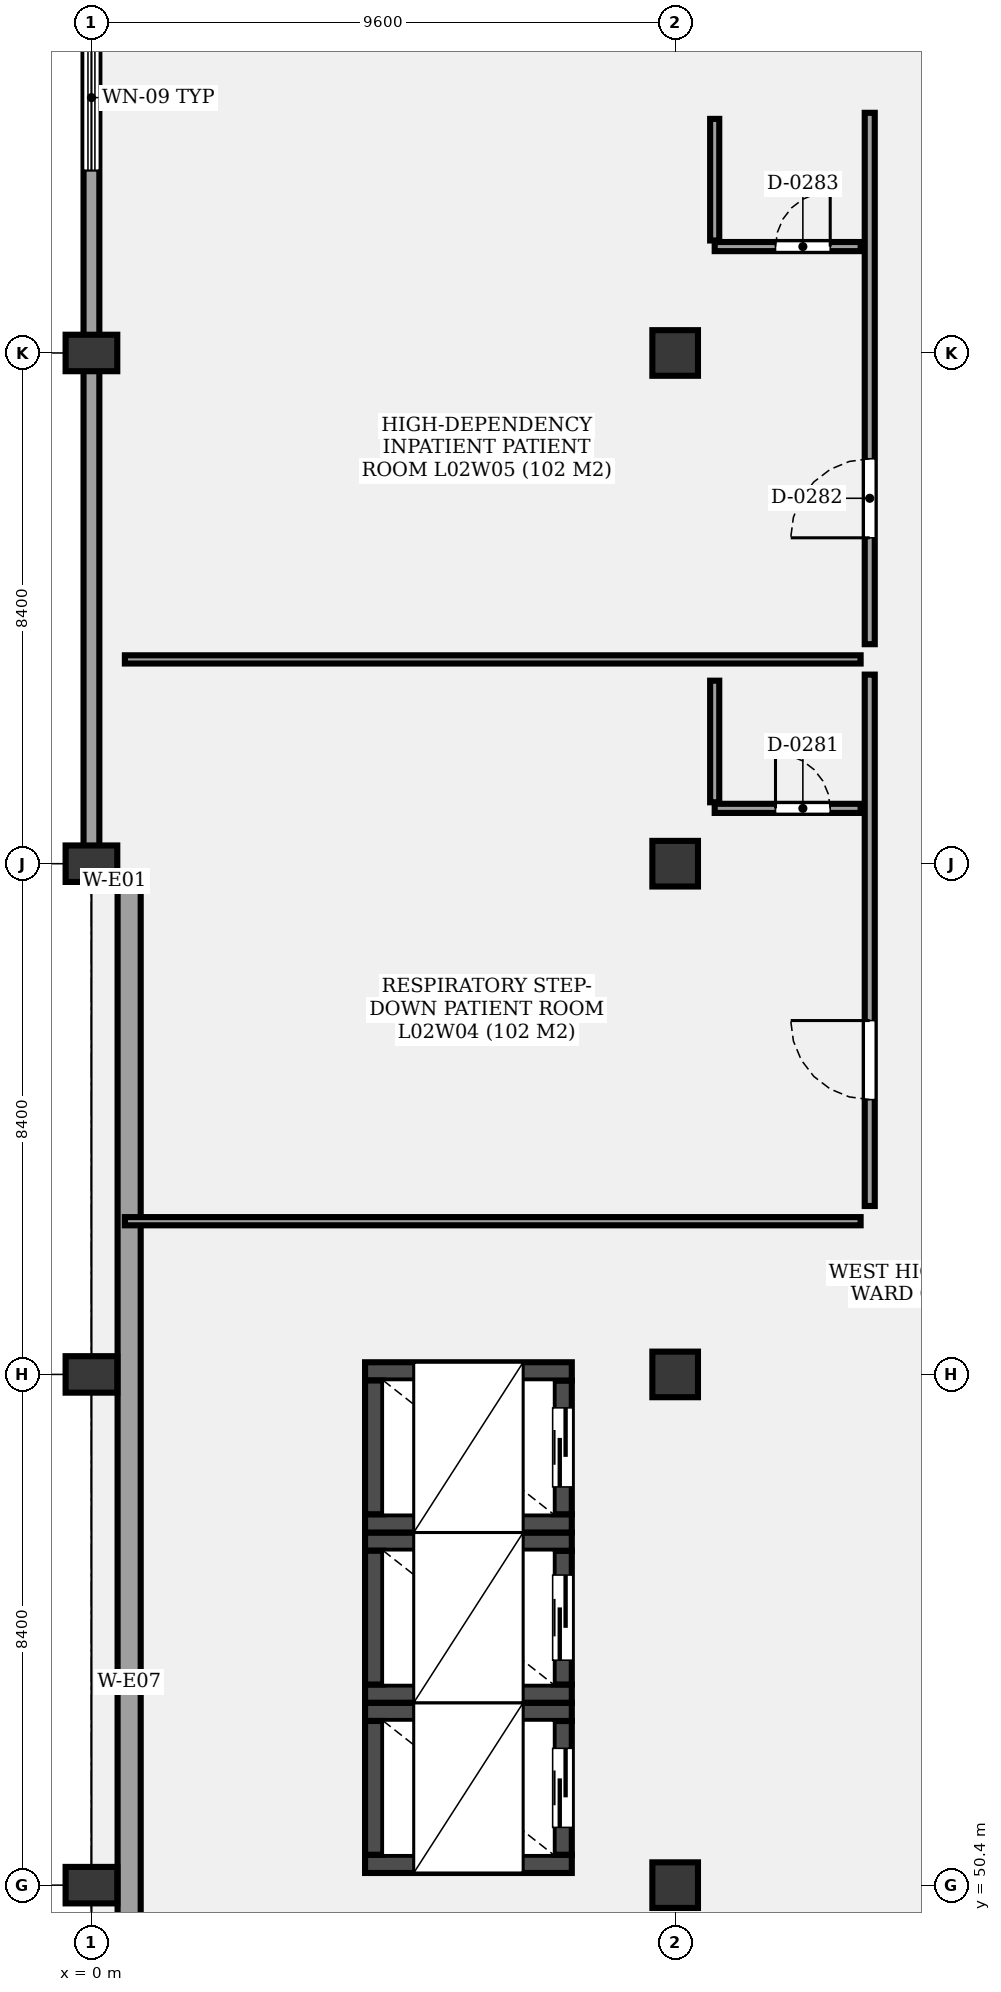
"""IFC4 building model, lengths in metres.
Left out: names, types, materials, properties, quantities, classifications, styles, units other than length and angle.
Written with IfcOpenShell. Run it as: python <this file> out.ifc"""

import sys

from ifc_helpers import new_model, si_unit, direction, frame, frame_2d, origin, origin_2d, place, context, subcontext, project, spatial, rectangle, extrude, element, fill, save


model = new_model("IFC4")
c1 = context("Model", 3, precision=1e-05, world=origin(), true_north=direction((0.0, 1.0)))
c2 = subcontext(c1, "Body", "Model", "MODEL_VIEW")
j1 = project(units=[si_unit("LENGTHUNIT", "METRE"), si_unit("PLANEANGLEUNIT", "RADIAN")], contexts=[c1])
p1 = place(None, origin())
s1 = spatial("IfcSite", under=j1, at=p1, CompositionType="ELEMENT")
p2 = place(p1, origin())
s2 = spatial("IfcBuilding", under=s1, at=p2, CompositionType="ELEMENT")
p3 = place(p2, frame((0.0, 0.0, 9.9)))
s3 = spatial("IfcBuildingStorey", under=s2, at=p3, CompositionType="ELEMENT", Elevation=9.9)
for number, where, z_axis, x_axis in (
    (1, (0.0, 50.4, 0.0), (0.0, 0.0, 1.0), (1.0, 0.0, 0.0)),
    (2, (0.0, 58.8, 0.0), (0.0, 0.0, 1.0), (1.0, 0.0, 0.0)),
    (3, (0.0, 67.2, 0.0), (0.0, 0.0, 1.0), (1.0, 0.0, 0.0)),
    (4, (0.0, 75.6, 0.0), (0.0, 0.0, 1.0), (1.0, 0.0, 0.0)),
):
    element("IfcColumn", number, at=place(p3, frame(where, z_axis=z_axis, x_axis=x_axis)), inside=s3, PredefinedType="COLUMN", context=c2, shape_type="SweptSolid", body=[
        extrude(rectangle(XDim=0.85, YDim=0.6, at=origin_2d()), origin(), (0.0, 0.0, 1.0), 3.6),
    ])
for number, where, z_axis, x_axis in (
    (5, (9.6, 50.4, 0.0), (0.0, 0.0, 1.0), (1.0, 0.0, 0.0)),
    (6, (9.6, 58.8, 0.0), (0.0, 0.0, 1.0), (1.0, 0.0, 0.0)),
    (7, (9.6, 67.2, 0.0), (0.0, 0.0, 1.0), (1.0, 0.0, 0.0)),
    (8, (9.6, 75.6, 0.0), (0.0, 0.0, 1.0), (1.0, 0.0, 0.0)),
):
    element("IfcColumn", number, at=place(p3, frame(where, z_axis=z_axis, x_axis=x_axis)), inside=s3, PredefinedType="COLUMN", context=c2, shape_type="SweptSolid", body=[
        extrude(rectangle(XDim=0.75, YDim=0.75, at=origin_2d()), origin(), (0.0, 0.0, 1.0), 3.6),
    ])
p4 = place(p3, frame((4.5, 50.75, 0.0), z_axis=(0.0, 0.0, 1.0), x_axis=(1.0, 0.0, 0.0)))
e9 = element("IfcWall", 9, at=p4, inside=s3, PredefinedType="SHEAR", context=c2, shape_type="SweptSolid", body=[
    extrude(rectangle(XDim=3.4, YDim=0.3, at=frame_2d((1.7, 0.0))), origin(), (0.0, 0.0, 1.0), 3.6),
])
p5 = place(p3, frame((7.75, 50.9, 0.0), z_axis=(0.0, 0.0, 1.0), x_axis=(0.0, 1.0, 0.0)))
e10 = element("IfcWall", 10, at=p5, inside=s3, PredefinedType="SHEAR", context=c2, shape_type="SweptSolid", body=[
    extrude(rectangle(XDim=2.2, YDim=0.3, at=frame_2d((1.1, 0.0))), origin(), (0.0, 0.0, 1.0), 3.6),
])
p6 = place(p5, frame((0.45, 0.0, 0.0)))
e11 = element("IfcOpeningElement", 11, at=p6, cuts=e10, PredefinedType="OPENING", context=c2, shape_type="SweptSolid", body=[
    extrude(rectangle(XDim=1.3, YDim=2.3, at=frame_2d((0.65, 1.15))), frame((0.0, 0.16, 0.0), z_axis=(0.0, -1.0, 0.0), x_axis=(1.0, 0.0, 0.0)), (0.0, 0.0, 1.0), 0.32),
])
p7 = place(p3, frame((7.9, 53.25, 0.0), z_axis=(0.0, 0.0, 1.0), x_axis=(-1.0, 0.0, 0.0)))
e12 = element("IfcWall", 12, at=p7, inside=s3, PredefinedType="SHEAR", context=c2, shape_type="SweptSolid", body=[
    extrude(rectangle(XDim=3.4, YDim=0.3, at=frame_2d((1.7, 0.0))), origin(), (0.0, 0.0, 1.0), 3.6),
])
p8 = place(p3, frame((4.65, 53.1, 0.0), z_axis=(0.0, 0.0, 1.0), x_axis=(0.0, -1.0, 0.0)))
e13 = element("IfcWall", 13, at=p8, inside=s3, PredefinedType="SHEAR", context=c2, shape_type="SweptSolid", body=[
    extrude(rectangle(XDim=2.2, YDim=0.3, at=frame_2d((1.1, 0.0))), origin(), (0.0, 0.0, 1.0), 3.6),
])
p9 = place(p3, frame((4.5, 53.55, 0.0), z_axis=(0.0, 0.0, 1.0), x_axis=(1.0, 0.0, 0.0)))
e14 = element("IfcWall", 14, at=p9, inside=s3, PredefinedType="SHEAR", context=c2, shape_type="SweptSolid", body=[
    extrude(rectangle(XDim=3.4, YDim=0.3, at=frame_2d((1.7, 0.0))), origin(), (0.0, 0.0, 1.0), 3.6),
])
p10 = place(p3, frame((7.75, 53.7, 0.0), z_axis=(0.0, 0.0, 1.0), x_axis=(0.0, 1.0, 0.0)))
e15 = element("IfcWall", 15, at=p10, inside=s3, PredefinedType="SHEAR", context=c2, shape_type="SweptSolid", body=[
    extrude(rectangle(XDim=2.2, YDim=0.3, at=frame_2d((1.1, 0.0))), origin(), (0.0, 0.0, 1.0), 3.6),
])
p11 = place(p10, frame((0.4, 0.0, 0.0)))
e16 = element("IfcOpeningElement", 16, at=p11, cuts=e15, PredefinedType="OPENING", context=c2, shape_type="SweptSolid", body=[
    extrude(rectangle(XDim=1.4, YDim=2.3, at=frame_2d((0.7, 1.15))), frame((0.0, 0.16, 0.0), z_axis=(0.0, -1.0, 0.0), x_axis=(1.0, 0.0, 0.0)), (0.0, 0.0, 1.0), 0.32),
])
p12 = place(p3, frame((7.9, 56.05, 0.0), z_axis=(0.0, 0.0, 1.0), x_axis=(-1.0, 0.0, 0.0)))
e17 = element("IfcWall", 17, at=p12, inside=s3, PredefinedType="SHEAR", context=c2, shape_type="SweptSolid", body=[
    extrude(rectangle(XDim=3.4, YDim=0.3, at=frame_2d((1.7, 0.0))), origin(), (0.0, 0.0, 1.0), 3.6),
])
p13 = place(p3, frame((4.65, 55.9, 0.0), z_axis=(0.0, 0.0, 1.0), x_axis=(0.0, -1.0, 0.0)))
e18 = element("IfcWall", 18, at=p13, inside=s3, PredefinedType="SHEAR", context=c2, shape_type="SweptSolid", body=[
    extrude(rectangle(XDim=2.2, YDim=0.3, at=frame_2d((1.1, 0.0))), origin(), (0.0, 0.0, 1.0), 3.6),
])
p14 = place(p3, frame((4.5, 56.35, 0.0), z_axis=(0.0, 0.0, 1.0), x_axis=(1.0, 0.0, 0.0)))
e19 = element("IfcWall", 19, at=p14, inside=s3, PredefinedType="SHEAR", context=c2, shape_type="SweptSolid", body=[
    extrude(rectangle(XDim=3.4, YDim=0.3, at=frame_2d((1.7, 0.0))), origin(), (0.0, 0.0, 1.0), 3.6),
])
p15 = place(p3, frame((7.75, 56.5, 0.0), z_axis=(0.0, 0.0, 1.0), x_axis=(0.0, 1.0, 0.0)))
e20 = element("IfcWall", 20, at=p15, inside=s3, PredefinedType="SHEAR", context=c2, shape_type="SweptSolid", body=[
    extrude(rectangle(XDim=2.2, YDim=0.3, at=frame_2d((1.1, 0.0))), origin(), (0.0, 0.0, 1.0), 3.6),
])
p16 = place(p15, frame((0.45, 0.0, 0.0)))
e21 = element("IfcOpeningElement", 21, at=p16, cuts=e20, PredefinedType="OPENING", context=c2, shape_type="SweptSolid", body=[
    extrude(rectangle(XDim=1.3, YDim=2.3, at=frame_2d((0.65, 1.15))), frame((0.0, 0.16, 0.0), z_axis=(0.0, -1.0, 0.0), x_axis=(1.0, 0.0, 0.0)), (0.0, 0.0, 1.0), 0.32),
])
p17 = place(p3, frame((7.9, 58.85, 0.0), z_axis=(0.0, 0.0, 1.0), x_axis=(-1.0, 0.0, 0.0)))
e22 = element("IfcWall", 22, at=p17, inside=s3, PredefinedType="SHEAR", context=c2, shape_type="SweptSolid", body=[
    extrude(rectangle(XDim=3.4, YDim=0.3, at=frame_2d((1.7, 0.0))), origin(), (0.0, 0.0, 1.0), 3.6),
])
p18 = place(p3, frame((4.65, 58.7, 0.0), z_axis=(0.0, 0.0, 1.0), x_axis=(0.0, -1.0, 0.0)))
e23 = element("IfcWall", 23, at=p18, inside=s3, PredefinedType="SHEAR", context=c2, shape_type="SweptSolid", body=[
    extrude(rectangle(XDim=2.2, YDim=0.3, at=frame_2d((1.1, 0.0))), origin(), (0.0, 0.0, 1.0), 3.6),
])
p19 = place(p3, frame((0.2, 66.92, 0.0), z_axis=(0.0, 0.0, 1.0), x_axis=(1.0, 0.0, 0.0)))
e24 = element("IfcWall", 24, at=p19, inside=s3, PredefinedType="SOLIDWALL", context=c2, shape_type="SweptSolid", body=[
    extrude(rectangle(XDim=0.36, YDim=0.26, at=frame_2d((0.18, 0.0))), origin(), (0.0, 0.0, 1.0), 2.57),
])
p20 = place(p3, frame((0.62, 34.18, 0.0), z_axis=(0.0, 0.0, 1.0), x_axis=(0.0, 1.0, 0.0)))
e25 = element("IfcWall", 25, at=p20, inside=s3, PredefinedType="SOLIDWALL", context=c2, shape_type="SweptSolid", body=[
    extrude(rectangle(XDim=32.6, YDim=0.38, at=frame_2d((16.3, 0.0))), origin(), (0.0, 0.0, 1.0), 2.57),
])
p21 = place(p3, frame((0.0, 67.2, 0.0), z_axis=(0.0, 0.0, 1.0), x_axis=(0.0, 1.0, 0.0)))
e26 = element("IfcWall", 26, at=p21, inside=s3, PredefinedType="SOLIDWALL", context=c2, shape_type="SweptSolid", body=[
    extrude(rectangle(XDim=25.2, YDim=0.26, at=frame_2d((12.6, 0.0))), origin(), (0.0, 0.0, 1.0), 2.57),
])
p22 = place(p21, frame((11.4, 0.0, 0.85)))
e27 = element("IfcOpeningElement", 27, at=p22, cuts=e26, PredefinedType="OPENING", context=c2, shape_type="SweptSolid", body=[
    extrude(rectangle(XDim=2.4, YDim=1.2, at=frame_2d((1.2, 0.6))), frame((0.0, 0.14, 0.0), z_axis=(0.0, -1.0, 0.0), x_axis=(1.0, 0.0, 0.0)), (0.0, 0.0, 1.0), 0.28),
])
p23 = place(p3, frame((12.8, 61.57, 0.0), z_axis=(0.0, 0.0, 1.0), x_axis=(0.0, 1.0, 0.0)))
e28 = element("IfcWall", 28, at=p23, inside=s3, PredefinedType="PARTITIONING", context=c2, shape_type="SweptSolid", body=[
    extrude(rectangle(XDim=8.74, YDim=0.165, at=frame_2d((4.37, 0.0))), origin(), (0.0, 0.0, 1.0), 2.48),
])
p24 = place(p23, frame((1.75, 0.0, 0.0)))
e29 = element("IfcOpeningElement", 29, at=p24, cuts=e28, PredefinedType="OPENING", context=c2, shape_type="SweptSolid", body=[
    extrude(rectangle(XDim=1.3, YDim=2.2, at=frame_2d((0.65, 1.1))), frame((0.0, 0.093, 0.0), z_axis=(0.0, -1.0, 0.0), x_axis=(1.0, 0.0, 0.0)), (0.0, 0.0, 1.0), 0.185),
])
p25 = place(p3, frame((10.25, 68.11, 0.0), z_axis=(0.0, 0.0, 1.0), x_axis=(1.0, 0.0, 0.0)))
e30 = element("IfcWall", 30, at=p25, inside=s3, PredefinedType="PARTITIONING", context=c2, shape_type="SweptSolid", body=[
    extrude(rectangle(XDim=2.4, YDim=0.15, at=frame_2d((1.2, 0.0))), origin(), (0.0, 0.0, 1.0), 2.48),
])
p26 = place(p25, frame((1.0, 0.0, 0.0)))
e31 = element("IfcOpeningElement", 31, at=p26, cuts=e30, PredefinedType="OPENING", context=c2, shape_type="SweptSolid", body=[
    extrude(rectangle(XDim=0.9, YDim=2.1, at=frame_2d((0.45, 1.05))), frame((0.0, 0.085, 0.0), z_axis=(0.0, -1.0, 0.0), x_axis=(1.0, 0.0, 0.0)), (0.0, 0.0, 1.0), 0.17),
])
p27 = place(p3, frame((10.25, 68.21, 0.0), z_axis=(0.0, 0.0, 1.0), x_axis=(0.0, 1.0, 0.0)))
e32 = element("IfcWall", 32, at=p27, inside=s3, PredefinedType="PARTITIONING", context=c2, shape_type="SweptSolid", body=[
    extrude(rectangle(XDim=2.0, YDim=0.15, at=frame_2d((1.0, 0.0))), origin(), (0.0, 0.0, 1.0), 2.48),
])
p28 = place(p3, frame((0.55, 61.32, 0.0), z_axis=(0.0, 0.0, 1.0), x_axis=(1.0, 0.0, 0.0)))
e33 = element("IfcWall", 33, at=p28, inside=s3, PredefinedType="PARTITIONING", context=c2, shape_type="SweptSolid", body=[
    extrude(rectangle(XDim=12.1, YDim=0.135, at=frame_2d((6.05, 0.0))), origin(), (0.0, 0.0, 1.0), 2.48),
])
p29 = place(p3, frame((12.8, 70.81, 0.0), z_axis=(0.0, 0.0, 1.0), x_axis=(0.0, 1.0, 0.0)))
e34 = element("IfcWall", 34, at=p29, inside=s3, PredefinedType="PARTITIONING", context=c2, shape_type="SweptSolid", body=[
    extrude(rectangle(XDim=8.74, YDim=0.165, at=frame_2d((4.37, 0.0))), origin(), (0.0, 0.0, 1.0), 2.48),
])
p30 = place(p29, frame((1.75, 0.0, 0.0)))
e35 = element("IfcOpeningElement", 35, at=p30, cuts=e34, PredefinedType="OPENING", context=c2, shape_type="SweptSolid", body=[
    extrude(rectangle(XDim=1.3, YDim=2.2, at=frame_2d((0.65, 1.1))), frame((0.0, 0.093, 0.0), z_axis=(0.0, -1.0, 0.0), x_axis=(1.0, 0.0, 0.0)), (0.0, 0.0, 1.0), 0.185),
])
p31 = place(p3, frame((10.25, 77.35, 0.0), z_axis=(0.0, 0.0, 1.0), x_axis=(1.0, 0.0, 0.0)))
e36 = element("IfcWall", 36, at=p31, inside=s3, PredefinedType="PARTITIONING", context=c2, shape_type="SweptSolid", body=[
    extrude(rectangle(XDim=2.4, YDim=0.15, at=frame_2d((1.2, 0.0))), origin(), (0.0, 0.0, 1.0), 2.48),
])
p32 = place(p31, frame((1.0, 0.0, 0.0)))
e37 = element("IfcOpeningElement", 37, at=p32, cuts=e36, PredefinedType="OPENING", context=c2, shape_type="SweptSolid", body=[
    extrude(rectangle(XDim=0.9, YDim=2.1, at=frame_2d((0.45, 1.05))), frame((0.0, 0.085, 0.0), z_axis=(0.0, -1.0, 0.0), x_axis=(1.0, 0.0, 0.0)), (0.0, 0.0, 1.0), 0.17),
])
p33 = place(p3, frame((10.25, 77.45, 0.0), z_axis=(0.0, 0.0, 1.0), x_axis=(0.0, 1.0, 0.0)))
e38 = element("IfcWall", 38, at=p33, inside=s3, PredefinedType="PARTITIONING", context=c2, shape_type="SweptSolid", body=[
    extrude(rectangle(XDim=2.0, YDim=0.15, at=frame_2d((1.0, 0.0))), origin(), (0.0, 0.0, 1.0), 2.48),
])
p34 = place(p3, frame((0.55, 70.56, 0.0), z_axis=(0.0, 0.0, 1.0), x_axis=(1.0, 0.0, 0.0)))
e39 = element("IfcWall", 39, at=p34, inside=s3, PredefinedType="PARTITIONING", context=c2, shape_type="SweptSolid", body=[
    extrude(rectangle(XDim=12.1, YDim=0.135, at=frame_2d((6.05, 0.0))), origin(), (0.0, 0.0, 1.0), 2.48),
])
p35 = place(p6, origin())
e40 = element("IfcDoor", 40, at=p35, inside=s3, OperationType="SLIDING_TO_LEFT", PredefinedType="DOOR", context=c2, shape_type="SweptSolid", body=[
    extrude(rectangle(XDim=1.3, YDim=2.3, at=frame_2d((0.65, 1.15))), frame((0.0, 0.025, 0.0), z_axis=(0.0, -1.0, 0.0), x_axis=(1.0, 0.0, 0.0)), (0.0, 0.0, 1.0), 0.05),
])
fill(e11, e40)
p36 = place(p11, origin())
e41 = element("IfcDoor", 41, at=p36, inside=s3, OperationType="SLIDING_TO_RIGHT", PredefinedType="DOOR", context=c2, shape_type="SweptSolid", body=[
    extrude(rectangle(XDim=1.4, YDim=2.3, at=frame_2d((0.7, 1.15))), frame((0.0, 0.025, 0.0), z_axis=(0.0, -1.0, 0.0), x_axis=(1.0, 0.0, 0.0)), (0.0, 0.0, 1.0), 0.05),
])
fill(e16, e41)
p37 = place(p16, origin())
e42 = element("IfcDoor", 42, at=p37, inside=s3, OperationType="SLIDING_TO_LEFT", PredefinedType="DOOR", context=c2, shape_type="SweptSolid", body=[
    extrude(rectangle(XDim=1.3, YDim=2.3, at=frame_2d((0.65, 1.15))), frame((0.0, 0.025, 0.0), z_axis=(0.0, -1.0, 0.0), x_axis=(1.0, 0.0, 0.0)), (0.0, 0.0, 1.0), 0.05),
])
fill(e21, e42)
p38 = place(p22, origin())
e43 = element("IfcWindow", 43, at=p38, inside=s3, PartitioningType="SINGLE_PANEL", PredefinedType="WINDOW", context=c2, shape_type="SweptSolid", body=[
    extrude(rectangle(XDim=2.4, YDim=1.2, at=frame_2d((1.2, 0.6))), frame((0.0, 0.03, 0.0), z_axis=(0.0, -1.0, 0.0), x_axis=(1.0, 0.0, 0.0)), (0.0, 0.0, 1.0), 0.06),
])
fill(e27, e43)
p39 = place(p24, origin())
e44 = element("IfcDoor", 44, at=p39, inside=s3, OperationType="SINGLE_SWING_RIGHT", PredefinedType="DOOR", context=c2, shape_type="SweptSolid", body=[
    extrude(rectangle(XDim=1.3, YDim=2.2, at=frame_2d((0.65, 1.1))), frame((0.0, 0.025, 0.0), z_axis=(0.0, -1.0, 0.0), x_axis=(1.0, 0.0, 0.0)), (0.0, 0.0, 1.0), 0.05),
])
fill(e29, e44)
p40 = place(p26, origin())
e45 = element("IfcDoor", 45, at=p40, inside=s3, OperationType="SINGLE_SWING_LEFT", PredefinedType="DOOR", context=c2, shape_type="SweptSolid", body=[
    extrude(rectangle(XDim=0.9, YDim=2.1, at=frame_2d((0.45, 1.05))), frame((0.0, 0.025, 0.0), z_axis=(0.0, -1.0, 0.0), x_axis=(1.0, 0.0, 0.0)), (0.0, 0.0, 1.0), 0.05),
])
fill(e31, e45)
p41 = place(p30, origin())
e46 = element("IfcDoor", 46, at=p41, inside=s3, OperationType="SINGLE_SWING_LEFT", PredefinedType="DOOR", context=c2, shape_type="SweptSolid", body=[
    extrude(rectangle(XDim=1.3, YDim=2.2, at=frame_2d((0.65, 1.1))), frame((0.0, 0.025, 0.0), z_axis=(0.0, -1.0, 0.0), x_axis=(1.0, 0.0, 0.0)), (0.0, 0.0, 1.0), 0.05),
])
fill(e35, e46)
p42 = place(p32, origin())
e47 = element("IfcDoor", 47, at=p42, inside=s3, OperationType="SINGLE_SWING_RIGHT", PredefinedType="DOOR", context=c2, shape_type="SweptSolid", body=[
    extrude(rectangle(XDim=0.9, YDim=2.1, at=frame_2d((0.45, 1.05))), frame((0.0, 0.025, 0.0), z_axis=(0.0, -1.0, 0.0), x_axis=(1.0, 0.0, 0.0)), (0.0, 0.0, 1.0), 0.05),
])
fill(e37, e47)
save(model, sys.argv[1])
